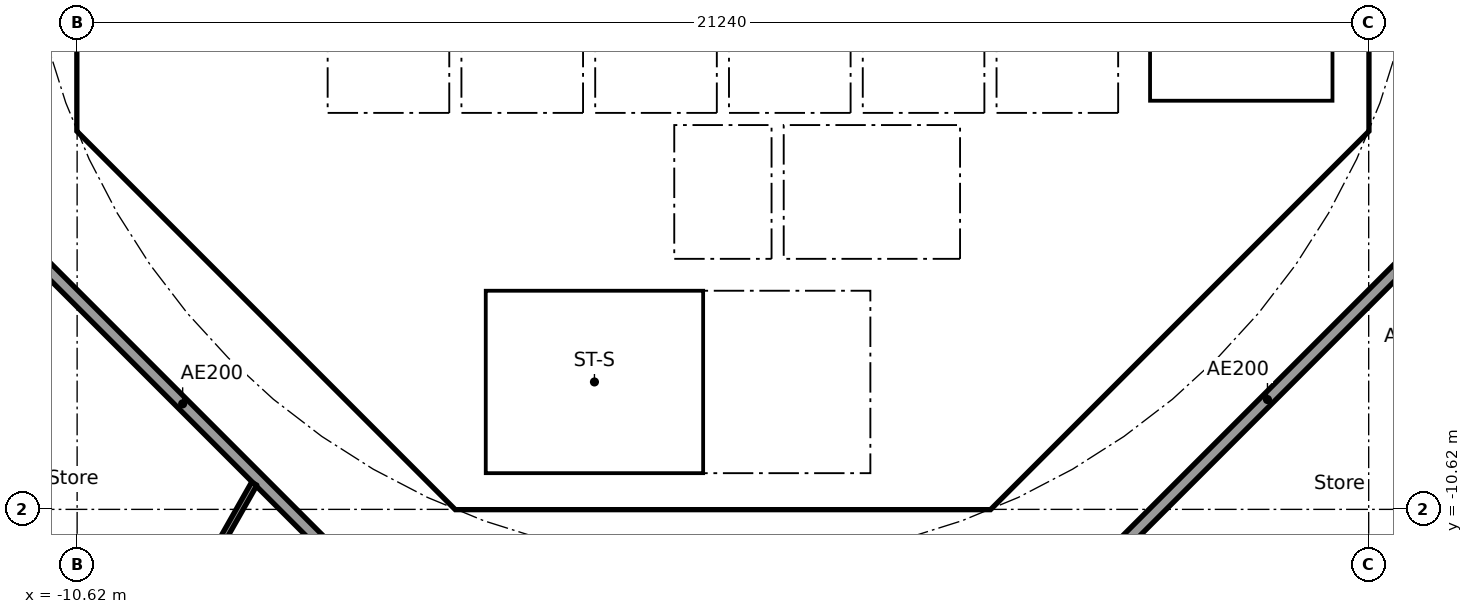
"""IFC4 building model, lengths in metres.
Left out: names, types, materials, properties, quantities, classifications, styles, units other than length and angle.
Written with IfcOpenShell. Run it as: python <this file> out.ifc"""

import sys

from ifc_helpers import new_model, si_unit, direction, frame, frame_2d, origin, place, context, subcontext, project, spatial, polyline, rectangle, outline, extrude, element, fill, save


model = new_model("IFC4")
c1 = context("Model", 3, precision=1e-05, world=origin(), true_north=direction((0.0, 1.0)))
c2 = subcontext(c1, "Body", "Model", "MODEL_VIEW")
j1 = project(units=[si_unit("LENGTHUNIT", "METRE"), si_unit("PLANEANGLEUNIT", "RADIAN")], contexts=[c1])
p1 = place(None, origin())
s1 = spatial("IfcSite", under=j1, at=p1, CompositionType="ELEMENT")
p2 = place(p1, origin())
s2 = spatial("IfcBuilding", under=s1, at=p2, CompositionType="ELEMENT")
p3 = place(p2, frame((0.0, 0.0, 80.7)))
s3 = spatial("IfcBuildingStorey", under=s2, at=p3, CompositionType="ELEMENT", Elevation=80.7)
p4 = place(p3, frame((-10.325, 3.801, 0.0), z_axis=(0.0, 0.0, 1.0), x_axis=(0.0, -1.0, 0.0)))
e1 = element("IfcWall", 1, at=p4, inside=s3, PredefinedType="SHEAR", context=c2, shape_type="SweptSolid", body=[
    extrude(rectangle(XDim=7.602, YDim=0.6, at=frame_2d((3.801, 0.0))), origin(), (0.0, 0.0, 1.0), 3.44),
])
p5 = place(p4, frame((0.651, 0.0, 0.0)))
e2 = element("IfcOpeningElement", 2, at=p5, cuts=e1, PredefinedType="OPENING", context=c2, shape_type="SweptSolid", body=[
    extrude(rectangle(XDim=1.5, YDim=2.1, at=frame_2d((0.75, 1.05))), frame((0.0, 0.31, 0.0), z_axis=(0.0, -1.0, 0.0), x_axis=(1.0, 0.0, 0.0)), (0.0, 0.0, 1.0), 0.62),
])
p6 = place(p4, frame((5.451, 0.0, 0.0)))
e3 = element("IfcOpeningElement", 3, at=p6, cuts=e1, PredefinedType="OPENING", context=c2, shape_type="SweptSolid", body=[
    extrude(rectangle(XDim=1.5, YDim=2.1, at=frame_2d((0.75, 1.05))), frame((0.0, 0.31, 0.0), z_axis=(0.0, -1.0, 0.0), x_axis=(1.0, 0.0, 0.0)), (0.0, 0.0, 1.0), 0.62),
])
p7 = place(p3, frame((-9.988, -4.613, 0.0), z_axis=(0.0, 0.0, 1.0), x_axis=(0.707106781187, -0.707106781187, 0.0)))
e4 = element("IfcWall", 4, at=p7, inside=s3, PredefinedType="SHEAR", context=c2, shape_type="SweptSolid", body=[
    extrude(rectangle(XDim=7.602, YDim=0.6, at=frame_2d((3.801, 0.0))), origin(), (0.0, 0.0, 1.0), 3.44),
])
p8 = place(p7, frame((6.151, 0.0, 0.0)))
e5 = element("IfcOpeningElement", 5, at=p8, cuts=e4, PredefinedType="OPENING", context=c2, shape_type="SweptSolid", body=[
    extrude(rectangle(XDim=1.1, YDim=2.1, at=frame_2d((0.55, 1.05))), frame((0.0, 0.31, 0.0), z_axis=(0.0, -1.0, 0.0), x_axis=(1.0, 0.0, 0.0)), (0.0, 0.0, 1.0), 0.62),
])
p9 = place(p3, frame((4.613, -9.988, 0.0), z_axis=(0.0, 0.0, 1.0), x_axis=(0.707106781187, 0.707106781187, 0.0)))
e6 = element("IfcWall", 6, at=p9, inside=s3, PredefinedType="SHEAR", context=c2, shape_type="SweptSolid", body=[
    extrude(rectangle(XDim=7.602, YDim=0.6, at=frame_2d((3.801, 0.0))), origin(), (0.0, 0.0, 1.0), 3.44),
])
p10 = place(p9, frame((3.201, 0.0, 0.0)))
e7 = element("IfcOpeningElement", 7, at=p10, cuts=e6, PredefinedType="OPENING", context=c2, shape_type="SweptSolid", body=[
    extrude(rectangle(XDim=1.2, YDim=2.1, at=frame_2d((0.6, 1.05))), frame((0.0, 0.31, 0.0), z_axis=(0.0, -1.0, 0.0), x_axis=(1.0, 0.0, 0.0)), (0.0, 0.0, 1.0), 0.62),
])
p11 = place(p3, frame((4.0, -10.025, 0.0), z_axis=(0.0, 0.0, 1.0), x_axis=(0.0, 1.0, 0.0)))
e8 = element("IfcWall", 8, at=p11, inside=s3, PredefinedType="SOLIDWALL", context=c2, shape_type="SweptSolid", body=[
    extrude(rectangle(XDim=3.0, YDim=0.2, at=frame_2d((1.5, 0.0))), origin(), (0.0, 0.0, 1.0), 3.44),
])
p12 = place(p11, frame((0.975, 0.0, 0.0)))
e9 = element("IfcOpeningElement", 9, at=p12, cuts=e8, PredefinedType="OPENING", context=c2, shape_type="SweptSolid", body=[
    extrude(rectangle(XDim=1.1, YDim=2.1, at=frame_2d((0.55, 1.05))), frame((0.0, 0.11, 0.0), z_axis=(0.0, -1.0, 0.0), x_axis=(1.0, 0.0, 0.0)), (0.0, 0.0, 1.0), 0.22),
])
p13 = place(p3, frame((-6.2, -7.827, 0.0), z_axis=(0.0, 0.0, 1.0), x_axis=(0.0, 1.0, 0.0)))
e10 = element("IfcWall", 10, at=p13, inside=s3, PredefinedType="PARTITIONING", context=c2, shape_type="SweptSolid", body=[
    extrude(rectangle(XDim=3.527, YDim=0.15, at=frame_2d((1.763, 0.0))), origin(), (0.0, 0.0, 1.0), 3.44),
])
p14 = place(p13, frame((2.365, 0.0, 0.0)))
e11 = element("IfcOpeningElement", 11, at=p14, cuts=e10, PredefinedType="OPENING", context=c2, shape_type="SweptSolid", body=[
    extrude(rectangle(XDim=0.9, YDim=2.1, at=frame_2d((0.45, 1.05))), frame((0.0, 0.085, 0.0), z_axis=(0.0, -1.0, 0.0), x_axis=(1.0, 0.0, 0.0)), (0.0, 0.0, 1.0), 0.17),
])
p15 = place(p13, frame((0.489, 0.0, 0.0)))
e12 = element("IfcOpeningElement", 12, at=p15, cuts=e10, PredefinedType="OPENING", context=c2, shape_type="SweptSolid", body=[
    extrude(rectangle(XDim=0.9, YDim=2.1, at=frame_2d((0.45, 1.05))), frame((0.0, 0.085, 0.0), z_axis=(0.0, -1.0, 0.0), x_axis=(1.0, 0.0, 0.0)), (0.0, 0.0, 1.0), 0.17),
])
p16 = place(p3, frame((4.0, -6.5, 0.0), z_axis=(0.0, 0.0, 1.0), x_axis=(0.0, 1.0, 0.0)))
e13 = element("IfcWall", 13, at=p16, inside=s3, PredefinedType="SOLIDWALL", context=c2, shape_type="SweptSolid", body=[
    extrude(rectangle(XDim=2.2, YDim=0.2, at=frame_2d((1.1, 0.0))), origin(), (0.0, 0.0, 1.0), 3.44),
])
p17 = place(p16, frame((0.55, 0.0, 0.0)))
e14 = element("IfcOpeningElement", 14, at=p17, cuts=e13, PredefinedType="OPENING", context=c2, shape_type="SweptSolid", body=[
    extrude(rectangle(XDim=1.1, YDim=2.1, at=frame_2d((0.55, 1.05))), frame((0.0, 0.11, 0.0), z_axis=(0.0, -1.0, 0.0), x_axis=(1.0, 0.0, 0.0)), (0.0, 0.0, 1.0), 0.22),
])
p18 = place(p3, frame((-4.0, -6.5, 0.0), z_axis=(0.0, 0.0, 1.0), x_axis=(0.0, 1.0, 0.0)))
e15 = element("IfcWall", 15, at=p18, inside=s3, PredefinedType="SOLIDWALL", context=c2, shape_type="SweptSolid", body=[
    extrude(rectangle(XDim=2.2, YDim=0.2, at=frame_2d((1.1, 0.0))), origin(), (0.0, 0.0, 1.0), 3.44),
])
p19 = place(p18, frame((0.65, 0.0, 0.0)))
e16 = element("IfcOpeningElement", 16, at=p19, cuts=e15, PredefinedType="OPENING", context=c2, shape_type="SweptSolid", body=[
    extrude(rectangle(XDim=0.9, YDim=2.1, at=frame_2d((0.45, 1.05))), frame((0.0, 0.11, 0.0), z_axis=(0.0, -1.0, 0.0), x_axis=(1.0, 0.0, 0.0)), (0.0, 0.0, 1.0), 0.22),
])
p20 = place(p3, origin())
e17 = element("IfcWall", 17, at=p20, inside=s3, PredefinedType="SHEAR", context=c2, shape_type="SweptSolid", body=[
    extrude(outline(polyline([(-10.625, -3.801), (-10.025, -3.801), (-10.025, -4.152), (-9.776, -4.401), (-10.2, -4.825), (-10.625, -4.401), (-10.625, -3.801)])), origin(), (0.0, 0.0, 1.0), 3.44),
])
p21 = place(p3, origin())
e18 = element("IfcWall", 18, at=p21, inside=s3, PredefinedType="SHEAR", context=c2, shape_type="SweptSolid", body=[
    extrude(outline(polyline([(-4.152, -10.025), (4.152, -10.025), (4.401, -9.776), (4.825, -10.2), (4.401, -10.625), (-4.401, -10.625), (-4.825, -10.2), (-4.401, -9.776), (-4.152, -10.025)])), origin(), (0.0, 0.0, 1.0), 3.44),
])
p22 = place(p3, origin())
e19 = element("IfcWall", 19, at=p22, inside=s3, PredefinedType="SHEAR", context=c2, shape_type="SweptSolid", body=[
    extrude(outline(polyline([(9.776, -4.401), (10.025, -4.152), (10.025, -3.801), (10.025, 4.152), (9.776, 4.401), (10.2, 4.825), (10.625, 4.401), (10.625, -4.401), (10.2, -4.825), (9.776, -4.401)])), origin(), (0.0, 0.0, 1.0), 3.44),
])
for number, where, z_axis, x_axis in (
    (20, (-0.9, -6.5, 0.0), (0.0, 0.0, 1.0), (0.0, 1.0, 0.0)),
    (21, (0.9, -6.5, 0.0), (0.0, 0.0, 1.0), (0.0, 1.0, 0.0)),
):
    element("IfcWall", number, at=place(p3, frame(where, z_axis=z_axis, x_axis=x_axis)), inside=s3, PredefinedType="SOLIDWALL", context=c2, shape_type="SweptSolid", body=[
        extrude(rectangle(XDim=2.2, YDim=0.2, at=frame_2d((1.1, 0.0))), origin(), (0.0, 0.0, 1.0), 3.44),
    ])
p23 = place(p3, origin())
e22 = element("IfcWall", 22, at=p23, inside=s3, PredefinedType="SOLIDWALL", context=c2, shape_type="SweptSolid", body=[
    extrude(outline(polyline([(-6.7, -2.1), (-6.5, -2.1), (-6.5, -4.1), (-4.5, -4.1), (-4.5, -2.1), (-4.3, -2.1), (-4.3, -4.1), (-2.3, -4.1), (-2.3, -2.1), (-2.1, -2.1), (-2.1, -4.1), (-0.1, -4.1), (-0.1, -2.1), (0.1, -2.1), (0.1, -4.1), (2.1, -4.1), (2.1, -2.1), (2.3, -2.1), (2.3, -4.1), (4.3, -4.1), (4.3, -2.1), (4.5, -2.1), (4.5, -4.1), (6.5, -4.1), (6.5, -2.1), (6.7, -2.1), (6.7, -4.3), (-6.7, -4.3), (-6.7, -2.1)])), origin(), (0.0, 0.0, 1.0), 3.44),
])
p24 = place(p3, frame((-10.025, -4.0, 0.0), z_axis=(0.0, 0.0, 1.0), x_axis=(1.0, 0.0, 0.0)))
e23 = element("IfcWall", 23, at=p24, inside=s3, PredefinedType="PARTITIONING", context=c2, shape_type="SweptSolid", body=[
    extrude(rectangle(XDim=3.325, YDim=0.2, at=frame_2d((1.662, 0.0))), origin(), (0.0, 0.0, 1.0), 3.44),
])
p25 = place(p3, frame((-8.301, -5.8, 0.0), z_axis=(0.0, 0.0, 1.0), x_axis=(1.0, 0.0, 0.0)))
e24 = element("IfcWall", 24, at=p25, inside=s3, PredefinedType="PARTITIONING", context=c2, shape_type="SweptSolid", body=[
    extrude(rectangle(XDim=2.026, YDim=0.15, at=frame_2d((1.013, 0.0))), origin(), (0.0, 0.0, 1.0), 3.44),
])
p26 = place(p3, origin())
e25 = element("IfcWall", 25, at=p26, inside=s3, PredefinedType="SOLIDWALL", context=c2, shape_type="SweptSolid", body=[
    extrude(outline(polyline([(-3.9, -10.025), (-4.1, -10.025), (-4.1, -7.025), (-3.9, -7.025), (-3.9, -10.025)])), origin(), (0.0, 0.0, 1.0), 3.44),
])
p27 = place(p3, origin())
e26 = element("IfcWall", 26, at=p27, inside=s3, PredefinedType="SOLIDWALL", context=c2, shape_type="SweptSolid", body=[
    extrude(outline(polyline([(4.1, -7.025), (-4.1, -7.025), (-4.1, -6.5), (4.1, -6.5), (4.1, -7.025)])), origin(), (0.0, 0.0, 1.0), 3.44),
])
p28 = place(p3, origin())
e27 = element("IfcWall", 27, at=p28, inside=s3, PredefinedType="SOLIDWALL", context=c2, shape_type="SweptSolid", body=[
    extrude(outline(polyline([(7.025, -3.9), (6.7, -3.9), (6.7, 3.9), (7.025, 3.9), (7.025, -3.9)])), origin(), (0.0, 0.0, 1.0), 3.44),
])
p29 = place(p3, origin())
e28 = element("IfcWall", 28, at=p29, inside=s3, PredefinedType="SOLIDWALL", context=c2, shape_type="SweptSolid", body=[
    extrude(outline(polyline([(10.025, -4.1), (6.7, -4.1), (6.7, -3.9), (10.025, -3.9), (10.025, -4.1)])), origin(), (0.0, 0.0, 1.0), 3.44),
])
p30 = place(p3, frame((-12.635, -5.134, 0.0), z_axis=(0.0, 0.0, 1.0), x_axis=(0.707106781187, -0.707106781187, 0.0)))
e29 = element("IfcWall", 29, at=p30, inside=s3, PredefinedType="PARTITIONING", context=c2, shape_type="SweptSolid", body=[
    extrude(rectangle(XDim=10.609, YDim=0.2, at=frame_2d((5.305, 0.0))), origin(), (0.0, 0.0, 1.0), 3.44),
])
p31 = place(p3, frame((5.275, -12.494, 0.0), z_axis=(0.0, 0.0, 1.0), x_axis=(0.707106781187, 0.707106781187, 0.0)))
e30 = element("IfcWall", 30, at=p31, inside=s3, PredefinedType="PARTITIONING", context=c2, shape_type="SweptSolid", body=[
    extrude(rectangle(XDim=10.409, YDim=0.2, at=frame_2d((5.205, 0.0))), origin(), (0.0, 0.0, 1.0), 3.44),
])
p32 = place(p3, frame((-13.118, -10.8, 0.0), z_axis=(0.0, 0.0, 1.0), x_axis=(0.72818280142, -0.685382964273, 0.0)))
e31 = element("IfcWall", 31, at=p32, inside=s3, PredefinedType="PARTITIONING", context=c2, shape_type="SweptSolid", body=[
    extrude(rectangle(XDim=4.586, YDim=0.1, at=frame_2d((2.293, 0.0))), origin(), (0.0, 0.0, 1.0), 2.762),
])
p33 = place(p32, frame((2.94, 0.0, 0.0)))
e32 = element("IfcOpeningElement", 32, at=p33, cuts=e31, PredefinedType="OPENING", context=c2, shape_type="SweptSolid", body=[
    extrude(rectangle(XDim=0.9, YDim=2.1, at=frame_2d((0.45, 1.05))), frame((0.0, 0.06, 0.0), z_axis=(0.0, -1.0, 0.0), x_axis=(1.0, 0.0, 0.0)), (0.0, 0.0, 1.0), 0.12),
])
p34 = place(p3, frame((-7.707, -10.198, 0.0), z_axis=(0.0, 0.0, 1.0), x_axis=(-0.493986531217, -0.869469554945, 0.0)))
e33 = element("IfcWall", 33, at=p34, inside=s3, PredefinedType="PARTITIONING", context=c2, shape_type="SweptSolid", body=[
    extrude(rectangle(XDim=4.217, YDim=0.1, at=frame_2d((2.109, 0.0))), origin(), (0.0, 0.0, 1.0), 2.687),
])
p35 = place(p17, origin())
e34 = element("IfcDoor", 34, at=p35, inside=s3, OperationType="DOUBLE_DOOR_SLIDING", PredefinedType="DOOR", context=c2, shape_type="SweptSolid", body=[
    extrude(rectangle(XDim=1.1, YDim=2.1, at=frame_2d((0.55, 1.05))), frame((0.0, 0.025, 0.0), z_axis=(0.0, -1.0, 0.0), x_axis=(1.0, 0.0, 0.0)), (0.0, 0.0, 1.0), 0.05),
])
fill(e14, e34)
p36 = place(p12, origin())
e35 = element("IfcDoor", 35, at=p36, inside=s3, OperationType="SINGLE_SWING_RIGHT", PredefinedType="DOOR", context=c2, shape_type="SweptSolid", body=[
    extrude(rectangle(XDim=1.1, YDim=2.1, at=frame_2d((0.55, 1.05))), frame((0.0, 0.025, 0.0), z_axis=(0.0, -1.0, 0.0), x_axis=(1.0, 0.0, 0.0)), (0.0, 0.0, 1.0), 0.05),
])
fill(e9, e35)
p37 = place(p14, origin())
e36 = element("IfcDoor", 36, at=p37, inside=s3, OperationType="SINGLE_SWING_RIGHT", PredefinedType="DOOR", context=c2, shape_type="SweptSolid", body=[
    extrude(rectangle(XDim=0.9, YDim=2.1, at=frame_2d((0.45, 1.05))), frame((0.0, 0.025, 0.0), z_axis=(0.0, -1.0, 0.0), x_axis=(1.0, 0.0, 0.0)), (0.0, 0.0, 1.0), 0.05),
])
fill(e11, e36)
p38 = place(p15, origin())
e37 = element("IfcDoor", 37, at=p38, inside=s3, OperationType="SINGLE_SWING_RIGHT", PredefinedType="DOOR", context=c2, shape_type="SweptSolid", body=[
    extrude(rectangle(XDim=0.9, YDim=2.1, at=frame_2d((0.45, 1.05))), frame((0.0, 0.025, 0.0), z_axis=(0.0, -1.0, 0.0), x_axis=(1.0, 0.0, 0.0)), (0.0, 0.0, 1.0), 0.05),
])
fill(e12, e37)
p39 = place(p19, frame((0.9, 0.0, 0.0), x_axis=(-1.0, 0.0, 0.0)))
e38 = element("IfcDoor", 38, at=p39, inside=s3, OperationType="SINGLE_SWING_RIGHT", PredefinedType="DOOR", context=c2, shape_type="SweptSolid", body=[
    extrude(rectangle(XDim=0.9, YDim=2.1, at=frame_2d((0.45, 1.05))), frame((0.0, 0.025, 0.0), z_axis=(0.0, -1.0, 0.0), x_axis=(1.0, 0.0, 0.0)), (0.0, 0.0, 1.0), 0.05),
])
fill(e16, e38)
p40 = place(p10, origin())
e39 = element("IfcDoor", 39, at=p40, inside=s3, OperationType="SINGLE_SWING_LEFT", PredefinedType="DOOR", context=c2, shape_type="SweptSolid", body=[
    extrude(rectangle(XDim=1.2, YDim=2.1, at=frame_2d((0.6, 1.05))), frame((0.0, 0.025, 0.0), z_axis=(0.0, -1.0, 0.0), x_axis=(1.0, 0.0, 0.0)), (0.0, 0.0, 1.0), 0.05),
])
fill(e7, e39)
p41 = place(p6, origin())
e40 = element("IfcDoor", 40, at=p41, inside=s3, OperationType="DOUBLE_DOOR_SINGLE_SWING", PredefinedType="DOOR", context=c2, shape_type="SweptSolid", body=[
    extrude(rectangle(XDim=1.5, YDim=2.1, at=frame_2d((0.75, 1.05))), frame((0.0, 0.025, 0.0), z_axis=(0.0, -1.0, 0.0), x_axis=(1.0, 0.0, 0.0)), (0.0, 0.0, 1.0), 0.05),
])
fill(e3, e40)
p42 = place(p8, origin())
e41 = element("IfcDoor", 41, at=p42, inside=s3, OperationType="SINGLE_SWING_LEFT", PredefinedType="DOOR", context=c2, shape_type="SweptSolid", body=[
    extrude(rectangle(XDim=1.1, YDim=2.1, at=frame_2d((0.55, 1.05))), frame((0.0, 0.025, 0.0), z_axis=(0.0, -1.0, 0.0), x_axis=(1.0, 0.0, 0.0)), (0.0, 0.0, 1.0), 0.05),
])
fill(e5, e41)
save(model, sys.argv[1])
